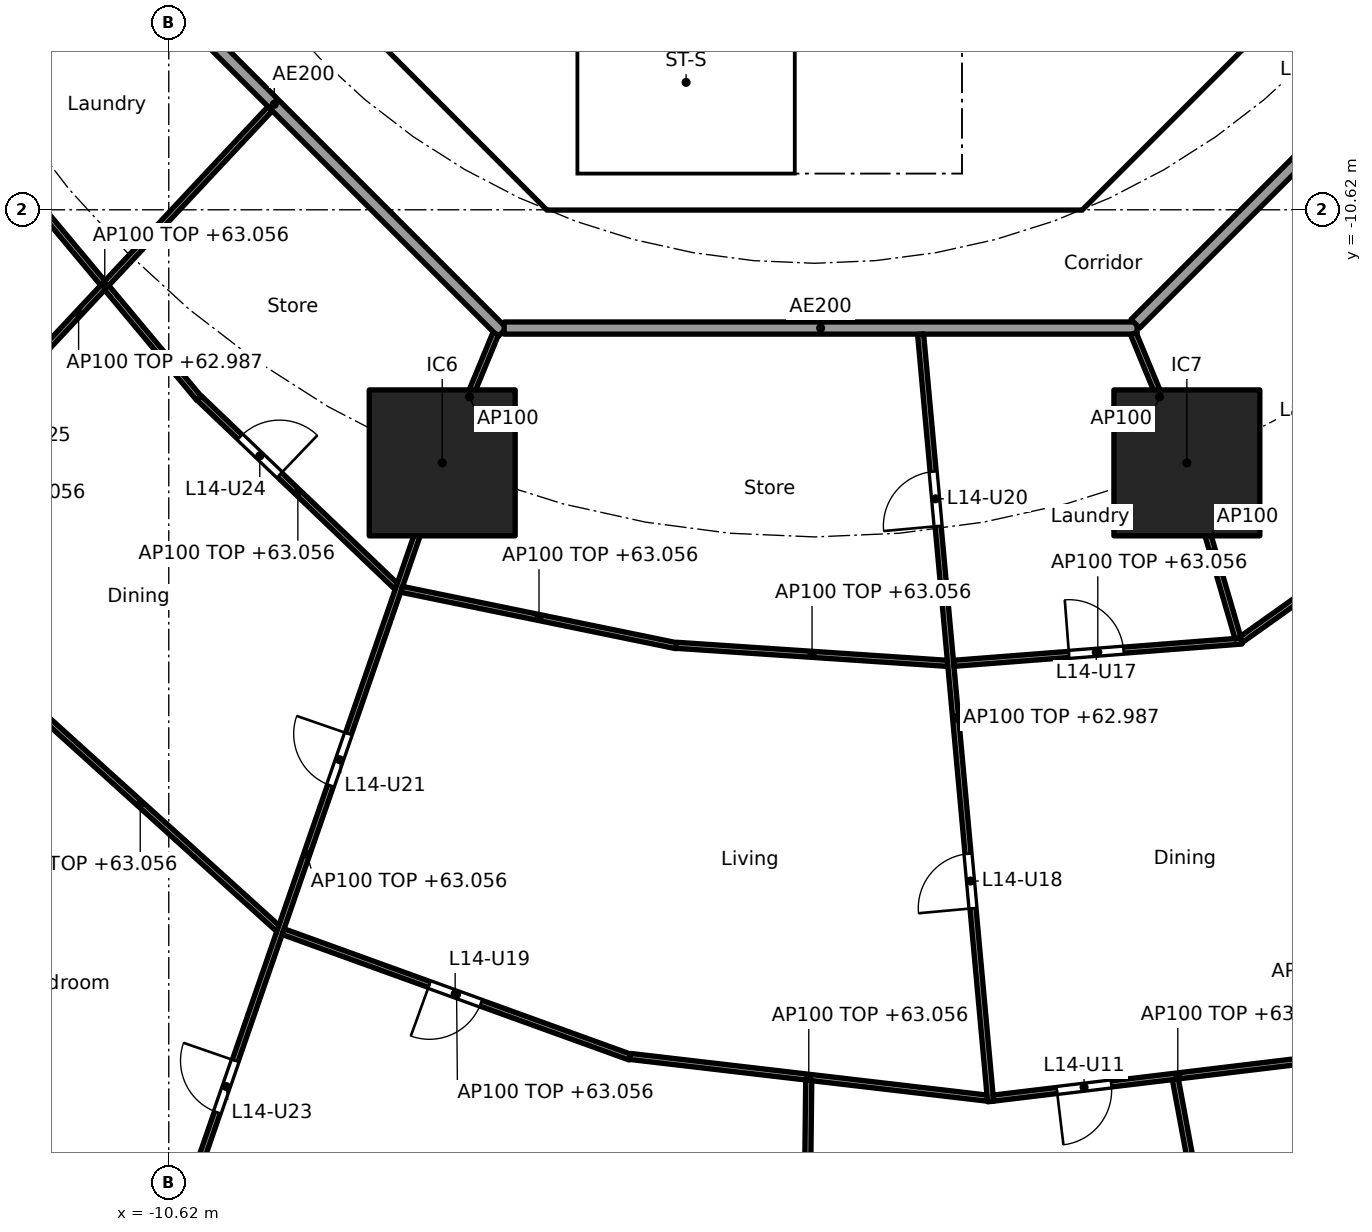
"""IFC4 building model, lengths in metres.
Left out: names, types, materials, properties, quantities, classifications, styles, units other than length and angle.
Written with IfcOpenShell. Run it as: python <this file> out.ifc"""

import sys

from ifc_helpers import new_model, si_unit, direction, frame, frame_2d, origin, origin_2d, place, context, subcontext, project, spatial, polyline, rectangle, outline, extrude, element, fill, save


model = new_model("IFC4")
c1 = context("Model", 3, precision=1e-05, world=origin(), true_north=direction((0.0, 1.0)))
c2 = subcontext(c1, "Body", "Model", "MODEL_VIEW")
j1 = project(units=[si_unit("LENGTHUNIT", "METRE"), si_unit("PLANEANGLEUNIT", "RADIAN")], contexts=[c1])
p1 = place(None, origin())
s1 = spatial("IfcSite", under=j1, at=p1, CompositionType="ELEMENT")
p2 = place(p1, origin())
s2 = spatial("IfcBuilding", under=s1, at=p2, CompositionType="ELEMENT")
p3 = place(p2, frame((0.0, 0.0, 60.3)))
s3 = spatial("IfcBuildingStorey", under=s2, at=p3, CompositionType="ELEMENT", Elevation=60.3)
for number, where, z_axis, x_axis in (
    (1, (-6.123, -14.782, 0.0), (0.0, 0.0, 1.0), (1.0, 0.0, 0.0)),
    (2, (6.123, -14.782, 0.0), (0.0, 0.0, 1.0), (1.0, 0.0, 0.0)),
):
    element("IfcColumn", number, at=place(p3, frame(where, z_axis=z_axis, x_axis=x_axis)), inside=s3, PredefinedType="COLUMN", context=c2, shape_type="SweptSolid", body=[
        extrude(rectangle(XDim=2.4, YDim=2.4, at=origin_2d()), origin(), (0.0, 0.0, 1.0), 3.7),
    ])
p4 = place(p3, frame((-11.382, -28.056, 0.0), z_axis=(0.0, 0.0, 1.0), x_axis=(-0.796022293214, 0.605267303517, 0.0)))
e3 = element("IfcWall", 3, at=p4, inside=s3, PredefinedType="SOLIDWALL", context=c2, shape_type="SweptSolid", body=[
    extrude(rectangle(XDim=3.262, YDim=0.25, at=frame_2d((1.631, 0.0))), origin(), (0.0, 0.0, 1.0), 3.44),
])
p5 = place(p4, frame((0.581, 0.0, 0.0)))
e4 = element("IfcOpeningElement", 4, at=p5, cuts=e3, PredefinedType="OPENING", context=c2, shape_type="SweptSolid", body=[
    extrude(rectangle(XDim=2.1, YDim=2.4, at=frame_2d((1.05, 1.2))), frame((0.0, 0.135, 0.0), z_axis=(0.0, -1.0, 0.0), x_axis=(1.0, 0.0, 0.0)), (0.0, 0.0, 1.0), 0.27),
])
p6 = place(p3, frame((-9.988, -4.613, 0.0), z_axis=(0.0, 0.0, 1.0), x_axis=(0.707106781187, -0.707106781187, 0.0)))
e5 = element("IfcWall", 5, at=p6, inside=s3, PredefinedType="SHEAR", context=c2, shape_type="SweptSolid", body=[
    extrude(rectangle(XDim=7.602, YDim=0.6, at=frame_2d((3.801, 0.0))), origin(), (0.0, 0.0, 1.0), 3.44),
])
p7 = place(p6, frame((6.151, 0.0, 0.0)))
e6 = element("IfcOpeningElement", 6, at=p7, cuts=e5, PredefinedType="OPENING", context=c2, shape_type="SweptSolid", body=[
    extrude(rectangle(XDim=1.1, YDim=2.1, at=frame_2d((0.55, 1.05))), frame((0.0, 0.31, 0.0), z_axis=(0.0, -1.0, 0.0), x_axis=(1.0, 0.0, 0.0)), (0.0, 0.0, 1.0), 0.62),
])
p8 = place(p3, frame((4.613, -9.988, 0.0), z_axis=(0.0, 0.0, 1.0), x_axis=(0.707106781187, 0.707106781187, 0.0)))
e7 = element("IfcWall", 7, at=p8, inside=s3, PredefinedType="SHEAR", context=c2, shape_type="SweptSolid", body=[
    extrude(rectangle(XDim=7.602, YDim=0.6, at=frame_2d((3.801, 0.0))), origin(), (0.0, 0.0, 1.0), 3.44),
])
p9 = place(p8, frame((3.201, 0.0, 0.0)))
e8 = element("IfcOpeningElement", 8, at=p9, cuts=e7, PredefinedType="OPENING", context=c2, shape_type="SweptSolid", body=[
    extrude(rectangle(XDim=1.2, YDim=2.1, at=frame_2d((0.6, 1.05))), frame((0.0, 0.31, 0.0), z_axis=(0.0, -1.0, 0.0), x_axis=(1.0, 0.0, 0.0)), (0.0, 0.0, 1.0), 0.62),
])
p10 = place(p3, frame((4.0, -10.025, 0.0), z_axis=(0.0, 0.0, 1.0), x_axis=(0.0, 1.0, 0.0)))
e9 = element("IfcWall", 9, at=p10, inside=s3, PredefinedType="SOLIDWALL", context=c2, shape_type="SweptSolid", body=[
    extrude(rectangle(XDim=3.0, YDim=0.2, at=frame_2d((1.5, 0.0))), origin(), (0.0, 0.0, 1.0), 3.44),
])
p11 = place(p10, frame((0.975, 0.0, 0.0)))
e10 = element("IfcOpeningElement", 10, at=p11, cuts=e9, PredefinedType="OPENING", context=c2, shape_type="SweptSolid", body=[
    extrude(rectangle(XDim=1.1, YDim=2.1, at=frame_2d((0.55, 1.05))), frame((0.0, 0.11, 0.0), z_axis=(0.0, -1.0, 0.0), x_axis=(1.0, 0.0, 0.0)), (0.0, 0.0, 1.0), 0.22),
])
p12 = place(p3, origin())
e11 = element("IfcWall", 11, at=p12, inside=s3, PredefinedType="SHEAR", context=c2, shape_type="SweptSolid", body=[
    extrude(outline(polyline([(-4.152, -10.025), (4.152, -10.025), (4.401, -9.776), (4.825, -10.2), (4.401, -10.625), (-4.401, -10.625), (-4.825, -10.2), (-4.401, -9.776), (-4.152, -10.025)])), origin(), (0.0, 0.0, 1.0), 3.44),
])
p13 = place(p3, origin())
e12 = element("IfcWall", 12, at=p13, inside=s3, PredefinedType="SOLIDWALL", context=c2, shape_type="SweptSolid", body=[
    extrude(outline(polyline([(-3.9, -10.025), (-4.1, -10.025), (-4.1, -7.025), (-3.9, -7.025), (-3.9, -10.025)])), origin(), (0.0, 0.0, 1.0), 3.44),
])
p14 = place(p3, frame((-12.635, -5.134, 0.0), z_axis=(0.0, 0.0, 1.0), x_axis=(0.707106781187, -0.707106781187, 0.0)))
e13 = element("IfcWall", 13, at=p14, inside=s3, PredefinedType="PARTITIONING", context=c2, shape_type="SweptSolid", body=[
    extrude(rectangle(XDim=10.609, YDim=0.2, at=frame_2d((5.305, 0.0))), origin(), (0.0, 0.0, 1.0), 3.44),
])
p15 = place(p3, frame((-5.104, -12.565, 0.0), z_axis=(0.0, 0.0, 1.0), x_axis=(1.0, 0.0, 0.0)))
e14 = element("IfcWall", 14, at=p15, inside=s3, PredefinedType="PARTITIONING", context=c2, shape_type="SweptSolid", body=[
    extrude(rectangle(XDim=10.409, YDim=0.2, at=frame_2d((5.205, 0.0))), origin(), (0.0, 0.0, 1.0), 3.44),
])
p16 = place(p3, frame((5.275, -12.494, 0.0), z_axis=(0.0, 0.0, 1.0), x_axis=(0.707106781187, 0.707106781187, 0.0)))
e15 = element("IfcWall", 15, at=p16, inside=s3, PredefinedType="PARTITIONING", context=c2, shape_type="SweptSolid", body=[
    extrude(rectangle(XDim=10.409, YDim=0.2, at=frame_2d((5.205, 0.0))), origin(), (0.0, 0.0, 1.0), 3.44),
])
p17 = place(p16, frame((4.604, 0.0, 0.0)))
e16 = element("IfcOpeningElement", 16, at=p17, cuts=e15, PredefinedType="OPENING", context=c2, shape_type="SweptSolid", body=[
    extrude(rectangle(XDim=1.0, YDim=2.1, at=frame_2d((0.5, 1.05))), frame((0.0, 0.11, 0.0), z_axis=(0.0, -1.0, 0.0), x_axis=(1.0, 0.0, 0.0)), (0.0, 0.0, 1.0), 0.22),
])
p18 = place(p3, frame((-13.222, -10.007, 0.0), z_axis=(0.0, 0.0, 1.0), x_axis=(0.64083455704, -0.767679015282, 0.0)))
e17 = element("IfcWall", 17, at=p18, inside=s3, PredefinedType="PARTITIONING", context=c2, shape_type="SweptSolid", body=[
    extrude(rectangle(XDim=4.837, YDim=0.1, at=frame_2d((2.418, 0.0))), origin(), (0.0, 0.0, 1.0), 2.756),
])
p19 = place(p3, frame((-8.953, -8.958, 0.0), z_axis=(0.0, 0.0, 1.0), x_axis=(-0.683322485948, -0.730116689439, 0.0)))
e18 = element("IfcWall", 18, at=p19, inside=s3, PredefinedType="PARTITIONING", context=c2, shape_type="SweptSolid", body=[
    extrude(rectangle(XDim=9.219, YDim=0.1, at=frame_2d((4.609, 0.0))), origin(), (0.0, 0.0, 1.0), 2.687),
])
p20 = place(p19, frame((6.149, 0.0, 0.0)))
e19 = element("IfcOpeningElement", 19, at=p20, cuts=e18, PredefinedType="OPENING", context=c2, shape_type="SweptSolid", body=[
    extrude(rectangle(XDim=0.9, YDim=2.1, at=frame_2d((0.45, 1.05))), frame((0.0, 0.06, 0.0), z_axis=(0.0, -1.0, 0.0), x_axis=(1.0, 0.0, 0.0)), (0.0, 0.0, 1.0), 0.12),
])
p21 = place(p3, frame((-10.119, -13.716, 0.0), z_axis=(0.0, 0.0, 1.0), x_axis=(0.722762371977, -0.691096631199, 0.0)))
e20 = element("IfcWall", 20, at=p21, inside=s3, PredefinedType="PARTITIONING", context=c2, shape_type="SweptSolid", body=[
    extrude(rectangle(XDim=4.487, YDim=0.1, at=frame_2d((2.244, 0.0))), origin(), (0.0, 0.0, 1.0), 2.756),
])
p22 = place(p21, frame((0.927, 0.0, 0.0)))
e21 = element("IfcOpeningElement", 21, at=p22, cuts=e20, PredefinedType="OPENING", context=c2, shape_type="SweptSolid", body=[
    extrude(rectangle(XDim=0.9, YDim=2.1, at=frame_2d((0.45, 1.05))), frame((0.0, 0.06, 0.0), z_axis=(0.0, -1.0, 0.0), x_axis=(1.0, 0.0, 0.0)), (0.0, 0.0, 1.0), 0.12),
])
p23 = place(p3, frame((-13.355, -18.343, 0.0), z_axis=(0.0, 0.0, 1.0), x_axis=(0.741722263338, -0.670707152242, 0.0)))
e22 = element("IfcWall", 22, at=p23, inside=s3, PredefinedType="PARTITIONING", context=c2, shape_type="SweptSolid", body=[
    extrude(rectangle(XDim=6.109, YDim=0.1, at=frame_2d((3.055, 0.0))), origin(), (0.0, 0.0, 1.0), 2.756),
])
p24 = place(p3, frame((-5.243, -12.657, 0.0), z_axis=(0.0, 0.0, 1.0), x_axis=(-0.382719158442, -0.923864733477, 0.0)))
e23 = element("IfcWall", 23, at=p24, inside=s3, PredefinedType="PARTITIONING", context=c2, shape_type="SweptSolid", body=[
    extrude(rectangle(XDim=2.25, YDim=0.1, at=frame_2d((1.125, 0.0))), origin(), (0.0, 0.0, 1.0), 3.44),
])
p25 = place(p3, frame((-6.139, -14.829, 0.0), z_axis=(0.0, 0.0, 1.0), x_axis=(-0.327178799566, -0.944962450637, 0.0)))
e24 = element("IfcWall", 24, at=p25, inside=s3, PredefinedType="PARTITIONING", context=c2, shape_type="SweptSolid", body=[
    extrude(rectangle(XDim=13.517, YDim=0.1, at=frame_2d((6.759, 0.0))), origin(), (0.0, 0.0, 1.0), 2.756),
])
p26 = place(p25, frame((4.665, 0.0, 0.0)))
e25 = element("IfcOpeningElement", 25, at=p26, cuts=e24, PredefinedType="OPENING", context=c2, shape_type="SweptSolid", body=[
    extrude(rectangle(XDim=0.9, YDim=2.1, at=frame_2d((0.45, 1.05))), frame((0.0, 0.06, 0.0), z_axis=(0.0, -1.0, 0.0), x_axis=(1.0, 0.0, 0.0)), (0.0, 0.0, 1.0), 0.12),
])
p27 = place(p25, frame((10.354, 0.0, 0.0)))
e26 = element("IfcOpeningElement", 26, at=p27, cuts=e24, PredefinedType="OPENING", context=c2, shape_type="SweptSolid", body=[
    extrude(rectangle(XDim=0.9, YDim=2.1, at=frame_2d((0.45, 1.05))), frame((0.0, 0.06, 0.0), z_axis=(0.0, -1.0, 0.0), x_axis=(1.0, 0.0, 0.0)), (0.0, 0.0, 1.0), 0.12),
])
p28 = place(p3, frame((-6.791, -16.862, 0.0), z_axis=(0.0, 0.0, 1.0), x_axis=(0.979587203416, -0.2010196779, 0.0)))
e27 = element("IfcWall", 27, at=p28, inside=s3, PredefinedType="PARTITIONING", context=c2, shape_type="SweptSolid", body=[
    extrude(rectangle(XDim=4.613, YDim=0.1, at=frame_2d((2.306, 0.0))), origin(), (0.0, 0.0, 1.0), 2.756),
])
p29 = place(p3, frame((-8.739, -22.491, 0.0), z_axis=(0.0, 0.0, 1.0), x_axis=(0.940401691072, -0.340065669288, 0.0)))
e28 = element("IfcWall", 28, at=p29, inside=s3, PredefinedType="PARTITIONING", context=c2, shape_type="SweptSolid", body=[
    extrude(rectangle(XDim=6.067, YDim=0.1, at=frame_2d((3.034, 0.0))), origin(), (0.0, 0.0, 1.0), 2.756),
])
p30 = place(p29, frame((2.559, 0.0, 0.0)))
e29 = element("IfcOpeningElement", 29, at=p30, cuts=e28, PredefinedType="OPENING", context=c2, shape_type="SweptSolid", body=[
    extrude(rectangle(XDim=0.9, YDim=2.1, at=frame_2d((0.45, 1.05))), frame((0.0, 0.06, 0.0), z_axis=(0.0, -1.0, 0.0), x_axis=(1.0, 0.0, 0.0)), (0.0, 0.0, 1.0), 0.12),
])
p31 = place(p3, frame((-2.271, -17.782, 0.0), z_axis=(0.0, 0.0, 1.0), x_axis=(0.997791437766, -0.066424744789, 0.0)))
e30 = element("IfcWall", 30, at=p31, inside=s3, PredefinedType="PARTITIONING", context=c2, shape_type="SweptSolid", body=[
    extrude(rectangle(XDim=4.469, YDim=0.1, at=frame_2d((2.235, 0.0))), origin(), (0.0, 0.0, 1.0), 2.756),
])
p32 = place(p3, frame((-3.031, -24.543, 0.0), z_axis=(0.0, 0.0, 1.0), x_axis=(0.993255612046, -0.115945198862, 0.0)))
e31 = element("IfcWall", 31, at=p32, inside=s3, PredefinedType="PARTITIONING", context=c2, shape_type="SweptSolid", body=[
    extrude(rectangle(XDim=5.913, YDim=0.1, at=frame_2d((2.956, 0.0))), origin(), (0.0, 0.0, 1.0), 2.756),
])
p33 = place(p3, frame((-0.095, -24.936, 0.0), z_axis=(0.0, 0.0, 1.0), x_axis=(-0.011541331541, -0.999933396615, 0.0)))
e32 = element("IfcWall", 32, at=p33, inside=s3, PredefinedType="PARTITIONING", context=c2, shape_type="SweptSolid", body=[
    extrude(rectangle(XDim=7.742, YDim=0.1, at=frame_2d((3.871, 0.0))), origin(), (0.0, 0.0, 1.0), 2.837),
])
p34 = place(p3, frame((1.744, -12.664, 0.0), z_axis=(0.0, 0.0, 1.0), x_axis=(0.090893569001, -0.995860612292, 0.0)))
e33 = element("IfcWall", 33, at=p34, inside=s3, PredefinedType="PARTITIONING", context=c2, shape_type="SweptSolid", body=[
    extrude(rectangle(XDim=12.673, YDim=0.1, at=frame_2d((6.336, 0.0))), origin(), (0.0, 0.0, 1.0), 2.687),
])
p35 = place(p34, frame((8.582, 0.0, 0.0)))
e34 = element("IfcOpeningElement", 34, at=p35, cuts=e33, PredefinedType="OPENING", context=c2, shape_type="SweptSolid", body=[
    extrude(rectangle(XDim=0.9, YDim=2.1, at=frame_2d((0.45, 1.05))), frame((0.0, 0.06, 0.0), z_axis=(0.0, -1.0, 0.0), x_axis=(1.0, 0.0, 0.0)), (0.0, 0.0, 1.0), 0.12),
])
p36 = place(p34, frame((2.27, 0.0, 0.0)))
e35 = element("IfcOpeningElement", 35, at=p36, cuts=e33, PredefinedType="OPENING", context=c2, shape_type="SweptSolid", body=[
    extrude(rectangle(XDim=0.9, YDim=2.1, at=frame_2d((0.45, 1.05))), frame((0.0, 0.06, 0.0), z_axis=(0.0, -1.0, 0.0), x_axis=(1.0, 0.0, 0.0)), (0.0, 0.0, 1.0), 0.12),
])
p37 = place(p3, frame((2.288, -18.078, 0.0), z_axis=(0.0, 0.0, 1.0), x_axis=(0.997016297228, 0.077191340583, 0.0)))
e36 = element("IfcWall", 36, at=p37, inside=s3, PredefinedType="PARTITIONING", context=c2, shape_type="SweptSolid", body=[
    extrude(rectangle(XDim=4.754, YDim=0.1, at=frame_2d((2.377, 0.0))), origin(), (0.0, 0.0, 1.0), 2.756),
])
p38 = place(p37, frame((1.902, 0.0, 0.0)))
e37 = element("IfcOpeningElement", 37, at=p38, cuts=e36, PredefinedType="OPENING", context=c2, shape_type="SweptSolid", body=[
    extrude(rectangle(XDim=0.9, YDim=2.1, at=frame_2d((0.45, 1.05))), frame((0.0, 0.06, 0.0), z_axis=(0.0, -1.0, 0.0), x_axis=(1.0, 0.0, 0.0)), (0.0, 0.0, 1.0), 0.12),
])
p39 = place(p3, frame((2.941, -25.229, 0.0), z_axis=(0.0, 0.0, 1.0), x_axis=(0.992836126149, 0.119484001497, 0.0)))
e38 = element("IfcWall", 38, at=p39, inside=s3, PredefinedType="PARTITIONING", context=c2, shape_type="SweptSolid", body=[
    extrude(rectangle(XDim=6.109, YDim=0.1, at=frame_2d((3.055, 0.0))), origin(), (0.0, 0.0, 1.0), 2.756),
])
p40 = place(p39, frame((1.052, 0.0, 0.0)))
e39 = element("IfcOpeningElement", 39, at=p40, cuts=e38, PredefinedType="OPENING", context=c2, shape_type="SweptSolid", body=[
    extrude(rectangle(XDim=0.9, YDim=2.1, at=frame_2d((0.45, 1.05))), frame((0.0, 0.06, 0.0), z_axis=(0.0, -1.0, 0.0), x_axis=(1.0, 0.0, 0.0)), (0.0, 0.0, 1.0), 0.12),
])
p41 = place(p3, frame((5.933, -24.919, 0.0), z_axis=(0.0, 0.0, 1.0), x_axis=(0.183018461258, -0.983109476528, 0.0)))
e40 = element("IfcWall", 40, at=p41, inside=s3, PredefinedType="PARTITIONING", context=c2, shape_type="SweptSolid", body=[
    extrude(rectangle(XDim=7.893, YDim=0.1, at=frame_2d((3.947, 0.0))), origin(), (0.0, 0.0, 1.0), 2.837),
])
p42 = place(p3, frame((5.243, -12.657, 0.0), z_axis=(0.0, 0.0, 1.0), x_axis=(0.382719158442, -0.923864733477, 0.0)))
e41 = element("IfcWall", 41, at=p42, inside=s3, PredefinedType="PARTITIONING", context=c2, shape_type="SweptSolid", body=[
    extrude(rectangle(XDim=2.25, YDim=0.1, at=frame_2d((1.125, 0.0))), origin(), (0.0, 0.0, 1.0), 3.44),
])
p43 = place(p3, frame((6.137, -14.83, 0.0), z_axis=(0.0, 0.0, 1.0), x_axis=(0.279888967793, -0.960032377427, 0.0)))
e42 = element("IfcWall", 42, at=p43, inside=s3, PredefinedType="PARTITIONING", context=c2, shape_type="SweptSolid", body=[
    extrude(rectangle(XDim=2.955, YDim=0.1, at=frame_2d((1.478, 0.0))), origin(), (0.0, 0.0, 1.0), 3.44),
])
p44 = place(p3, frame((7.019, -17.686, 0.0), z_axis=(0.0, 0.0, 1.0), x_axis=(0.81494477814, 0.57953861699, 0.0)))
e43 = element("IfcWall", 43, at=p44, inside=s3, PredefinedType="PARTITIONING", context=c2, shape_type="SweptSolid", body=[
    extrude(rectangle(XDim=3.644, YDim=0.1, at=frame_2d((1.822, 0.0))), origin(), (0.0, 0.0, 1.0), 2.756),
])
p45 = place(p44, frame((2.564, 0.0, 0.0)))
e44 = element("IfcOpeningElement", 44, at=p45, cuts=e43, PredefinedType="OPENING", context=c2, shape_type="SweptSolid", body=[
    extrude(rectangle(XDim=0.9, YDim=2.1, at=frame_2d((0.45, 1.05))), frame((0.0, 0.06, 0.0), z_axis=(0.0, -1.0, 0.0), x_axis=(1.0, 0.0, 0.0)), (0.0, 0.0, 1.0), 0.12),
])
p46 = place(p11, origin())
e45 = element("IfcDoor", 45, at=p46, inside=s3, OperationType="SINGLE_SWING_RIGHT", PredefinedType="DOOR", context=c2, shape_type="SweptSolid", body=[
    extrude(rectangle(XDim=1.1, YDim=2.1, at=frame_2d((0.55, 1.05))), frame((0.0, 0.025, 0.0), z_axis=(0.0, -1.0, 0.0), x_axis=(1.0, 0.0, 0.0)), (0.0, 0.0, 1.0), 0.05),
])
fill(e10, e45)
p47 = place(p7, origin())
e46 = element("IfcDoor", 46, at=p47, inside=s3, OperationType="SINGLE_SWING_RIGHT", PredefinedType="DOOR", context=c2, shape_type="SweptSolid", body=[
    extrude(rectangle(XDim=1.1, YDim=2.1, at=frame_2d((0.55, 1.05))), frame((0.0, 0.025, 0.0), z_axis=(0.0, -1.0, 0.0), x_axis=(1.0, 0.0, 0.0)), (0.0, 0.0, 1.0), 0.05),
])
fill(e6, e46)
p48 = place(p40, frame((0.9, 0.0, 0.0), x_axis=(-1.0, 0.0, 0.0)))
e47 = element("IfcDoor", 47, at=p48, inside=s3, OperationType="SINGLE_SWING_RIGHT", PredefinedType="DOOR", context=c2, shape_type="SweptSolid", body=[
    extrude(rectangle(XDim=0.9, YDim=2.1, at=frame_2d((0.45, 1.05))), frame((0.0, 0.025, 0.0), z_axis=(0.0, -1.0, 0.0), x_axis=(1.0, 0.0, 0.0)), (0.0, 0.0, 1.0), 0.05),
])
fill(e39, e47)
p49 = place(p38, origin())
e48 = element("IfcDoor", 48, at=p49, inside=s3, OperationType="SINGLE_SWING_LEFT", PredefinedType="DOOR", context=c2, shape_type="SweptSolid", body=[
    extrude(rectangle(XDim=0.9, YDim=2.1, at=frame_2d((0.45, 1.05))), frame((0.0, 0.025, 0.0), z_axis=(0.0, -1.0, 0.0), x_axis=(1.0, 0.0, 0.0)), (0.0, 0.0, 1.0), 0.05),
])
fill(e37, e48)
p50 = place(p35, frame((0.9, 0.0, 0.0), x_axis=(-1.0, 0.0, 0.0)))
e49 = element("IfcDoor", 49, at=p50, inside=s3, OperationType="SINGLE_SWING_LEFT", PredefinedType="DOOR", context=c2, shape_type="SweptSolid", body=[
    extrude(rectangle(XDim=0.9, YDim=2.1, at=frame_2d((0.45, 1.05))), frame((0.0, 0.025, 0.0), z_axis=(0.0, -1.0, 0.0), x_axis=(1.0, 0.0, 0.0)), (0.0, 0.0, 1.0), 0.05),
])
fill(e34, e49)
p51 = place(p30, frame((0.9, 0.0, 0.0), x_axis=(-1.0, 0.0, 0.0)))
e50 = element("IfcDoor", 50, at=p51, inside=s3, OperationType="SINGLE_SWING_RIGHT", PredefinedType="DOOR", context=c2, shape_type="SweptSolid", body=[
    extrude(rectangle(XDim=0.9, YDim=2.1, at=frame_2d((0.45, 1.05))), frame((0.0, 0.025, 0.0), z_axis=(0.0, -1.0, 0.0), x_axis=(1.0, 0.0, 0.0)), (0.0, 0.0, 1.0), 0.05),
])
fill(e29, e50)
p52 = place(p36, frame((0.9, 0.0, 0.0), x_axis=(-1.0, 0.0, 0.0)))
e51 = element("IfcDoor", 51, at=p52, inside=s3, OperationType="SINGLE_SWING_LEFT", PredefinedType="DOOR", context=c2, shape_type="SweptSolid", body=[
    extrude(rectangle(XDim=0.9, YDim=2.1, at=frame_2d((0.45, 1.05))), frame((0.0, 0.025, 0.0), z_axis=(0.0, -1.0, 0.0), x_axis=(1.0, 0.0, 0.0)), (0.0, 0.0, 1.0), 0.05),
])
fill(e35, e51)
p53 = place(p26, frame((0.9, 0.0, 0.0), x_axis=(-1.0, 0.0, 0.0)))
e52 = element("IfcDoor", 52, at=p53, inside=s3, OperationType="SINGLE_SWING_RIGHT", PredefinedType="DOOR", context=c2, shape_type="SweptSolid", body=[
    extrude(rectangle(XDim=0.9, YDim=2.1, at=frame_2d((0.45, 1.05))), frame((0.0, 0.025, 0.0), z_axis=(0.0, -1.0, 0.0), x_axis=(1.0, 0.0, 0.0)), (0.0, 0.0, 1.0), 0.05),
])
fill(e25, e52)
p54 = place(p27, frame((0.9, 0.0, 0.0), x_axis=(-1.0, 0.0, 0.0)))
e53 = element("IfcDoor", 53, at=p54, inside=s3, OperationType="SINGLE_SWING_RIGHT", PredefinedType="DOOR", context=c2, shape_type="SweptSolid", body=[
    extrude(rectangle(XDim=0.9, YDim=2.1, at=frame_2d((0.45, 1.05))), frame((0.0, 0.025, 0.0), z_axis=(0.0, -1.0, 0.0), x_axis=(1.0, 0.0, 0.0)), (0.0, 0.0, 1.0), 0.05),
])
fill(e26, e53)
p55 = place(p22, origin())
e54 = element("IfcDoor", 54, at=p55, inside=s3, OperationType="SINGLE_SWING_RIGHT", PredefinedType="DOOR", context=c2, shape_type="SweptSolid", body=[
    extrude(rectangle(XDim=0.9, YDim=2.1, at=frame_2d((0.45, 1.05))), frame((0.0, 0.025, 0.0), z_axis=(0.0, -1.0, 0.0), x_axis=(1.0, 0.0, 0.0)), (0.0, 0.0, 1.0), 0.05),
])
fill(e21, e54)
save(model, sys.argv[1])
